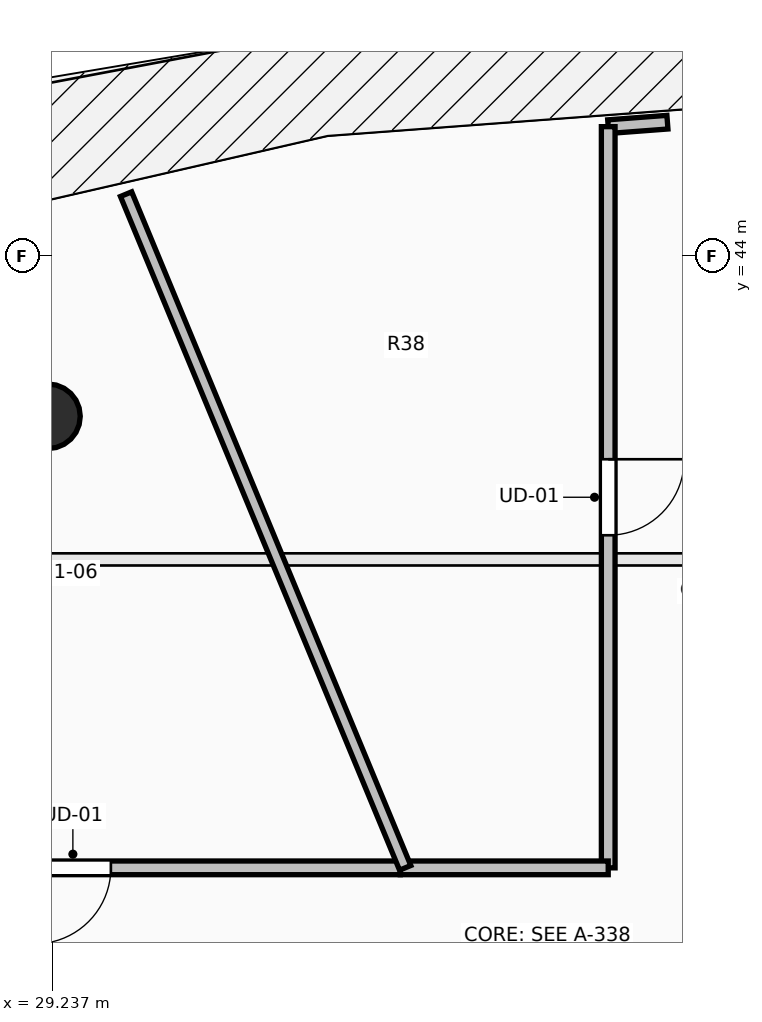
"""IFC4 building model, lengths in metres.
Left out: names, types, materials, properties, quantities, classifications, styles, units other than length and angle.
Written with IfcOpenShell. Run it as: python <this file> out.ifc"""

import sys

from ifc_helpers import new_model, si_unit, direction, frame, frame_2d, origin, origin_2d, place, context, subcontext, project, spatial, rectangle, circle, extrude, element, fill, save


model = new_model("IFC4")
c1 = context("Model", 3, precision=1e-05, world=origin(), true_north=direction((0.0, 1.0)))
c2 = subcontext(c1, "Body", "Model", "MODEL_VIEW")
j1 = project(units=[si_unit("LENGTHUNIT", "METRE"), si_unit("PLANEANGLEUNIT", "RADIAN")], contexts=[c1])
p1 = place(None, origin())
s1 = spatial("IfcSite", under=j1, at=p1, CompositionType="ELEMENT")
p2 = place(p1, origin())
s2 = spatial("IfcBuilding", under=s1, at=p2, CompositionType="ELEMENT")
p3 = place(p2, frame((0.0, 0.0, 262.65)))
s3 = spatial("IfcBuildingStorey", under=s2, at=p3, CompositionType="ELEMENT", Elevation=262.65)
p4 = place(p3, frame((29.179, 41.891, 0.0), z_axis=(0.0, 0.0, 1.0), x_axis=(-0.382683432365, 0.923879532511, 0.0)))
e1 = element("IfcColumn", 1, at=p4, inside=s3, PredefinedType="COLUMN", context=c2, shape_type="SweptSolid", body=[
    extrude(circle(Radius=0.425, at=origin_2d()), origin(), (0.0, 0.0, 1.0), 3.55),
])
p5 = place(p3, frame((37.329, 45.76, 0.0), z_axis=(0.0, 0.0, 1.0), x_axis=(-0.997136622012, -0.0756211415, 0.0)))
e2 = element("IfcWall", 2, at=p5, inside=s3, PredefinedType="PARTITIONING", context=c2, shape_type="SweptSolid", body=[
    extrude(rectangle(XDim=0.781, YDim=0.18, at=frame_2d((0.391, 0.0))), origin(), (0.0, 0.0, 1.0), 3.29),
])
p6 = place(p3, frame((36.55, 45.701, 0.0), z_axis=(0.0, 0.0, 1.0), x_axis=(0.0, -1.0, 0.0)))
e3 = element("IfcWall", 3, at=p6, inside=s3, PredefinedType="PARTITIONING", context=c2, shape_type="SweptSolid", body=[
    extrude(rectangle(XDim=9.751, YDim=0.18, at=frame_2d((4.875, 0.0))), origin(), (0.0, 0.0, 1.0), 2.482),
])
p7 = place(p6, frame((4.375, 0.0, 0.0)))
e4 = element("IfcOpeningElement", 4, at=p7, cuts=e3, PredefinedType="OPENING", context=c2, shape_type="SweptSolid", body=[
    extrude(rectangle(XDim=1.0, YDim=2.15, at=frame_2d((0.5, 1.075))), frame((0.0, 0.105, 0.0), z_axis=(0.0, -1.0, 0.0), x_axis=(1.0, 0.0, 0.0)), (0.0, 0.0, 1.0), 0.21),
])
p8 = place(p3, frame((36.55, 35.95, 0.0), z_axis=(0.0, 0.0, 1.0), x_axis=(-1.0, 0.0, 0.0)))
e5 = element("IfcWall", 5, at=p8, inside=s3, PredefinedType="PARTITIONING", context=c2, shape_type="SweptSolid", body=[
    extrude(rectangle(XDim=2.736, YDim=0.18, at=frame_2d((1.368, 0.0))), origin(), (0.0, 0.0, 1.0), 3.29),
])
p9 = place(p3, frame((33.814, 35.95, 0.0), z_axis=(0.0, 0.0, 1.0), x_axis=(-1.0, 0.0, 0.0)))
e6 = element("IfcWall", 6, at=p9, inside=s3, PredefinedType="PARTITIONING", context=c2, shape_type="SweptSolid", body=[
    extrude(rectangle(XDim=8.614, YDim=0.18, at=frame_2d((4.307, 0.0))), origin(), (0.0, 0.0, 1.0), 2.482),
])
p10 = place(p9, frame((3.807, 0.0, 0.0)))
e7 = element("IfcOpeningElement", 7, at=p10, cuts=e6, PredefinedType="OPENING", context=c2, shape_type="SweptSolid", body=[
    extrude(rectangle(XDim=1.0, YDim=2.15, at=frame_2d((0.5, 1.075))), frame((0.0, 0.105, 0.0), z_axis=(0.0, -1.0, 0.0), x_axis=(1.0, 0.0, 0.0)), (0.0, 0.0, 1.0), 0.21),
])
p11 = place(p3, frame((30.207, 44.813, 0.0), z_axis=(0.0, 0.0, 1.0), x_axis=(0.38274436158, -0.92385429245, 0.0)))
e8 = element("IfcWall", 8, at=p11, inside=s3, PredefinedType="PARTITIONING", context=c2, shape_type="SweptSolid", body=[
    extrude(rectangle(XDim=9.594, YDim=0.16, at=frame_2d((4.797, 0.0))), origin(), (0.0, 0.0, 1.0), 2.482),
])
p12 = place(p7, origin())
e9 = element("IfcDoor", 9, at=p12, inside=s3, OperationType="SINGLE_SWING_LEFT", PredefinedType="DOOR", context=c2, shape_type="SweptSolid", body=[
    extrude(rectangle(XDim=1.0, YDim=2.15, at=frame_2d((0.5, 1.075))), frame((0.0, 0.025, 0.0), z_axis=(0.0, -1.0, 0.0), x_axis=(1.0, 0.0, 0.0)), (0.0, 0.0, 1.0), 0.05),
])
fill(e4, e9)
p13 = place(p10, origin())
e10 = element("IfcDoor", 10, at=p13, inside=s3, OperationType="SINGLE_SWING_RIGHT", PredefinedType="DOOR", context=c2, shape_type="SweptSolid", body=[
    extrude(rectangle(XDim=1.0, YDim=2.15, at=frame_2d((0.5, 1.075))), frame((0.0, 0.025, 0.0), z_axis=(0.0, -1.0, 0.0), x_axis=(1.0, 0.0, 0.0)), (0.0, 0.0, 1.0), 0.05),
])
fill(e7, e10)
save(model, sys.argv[1])
